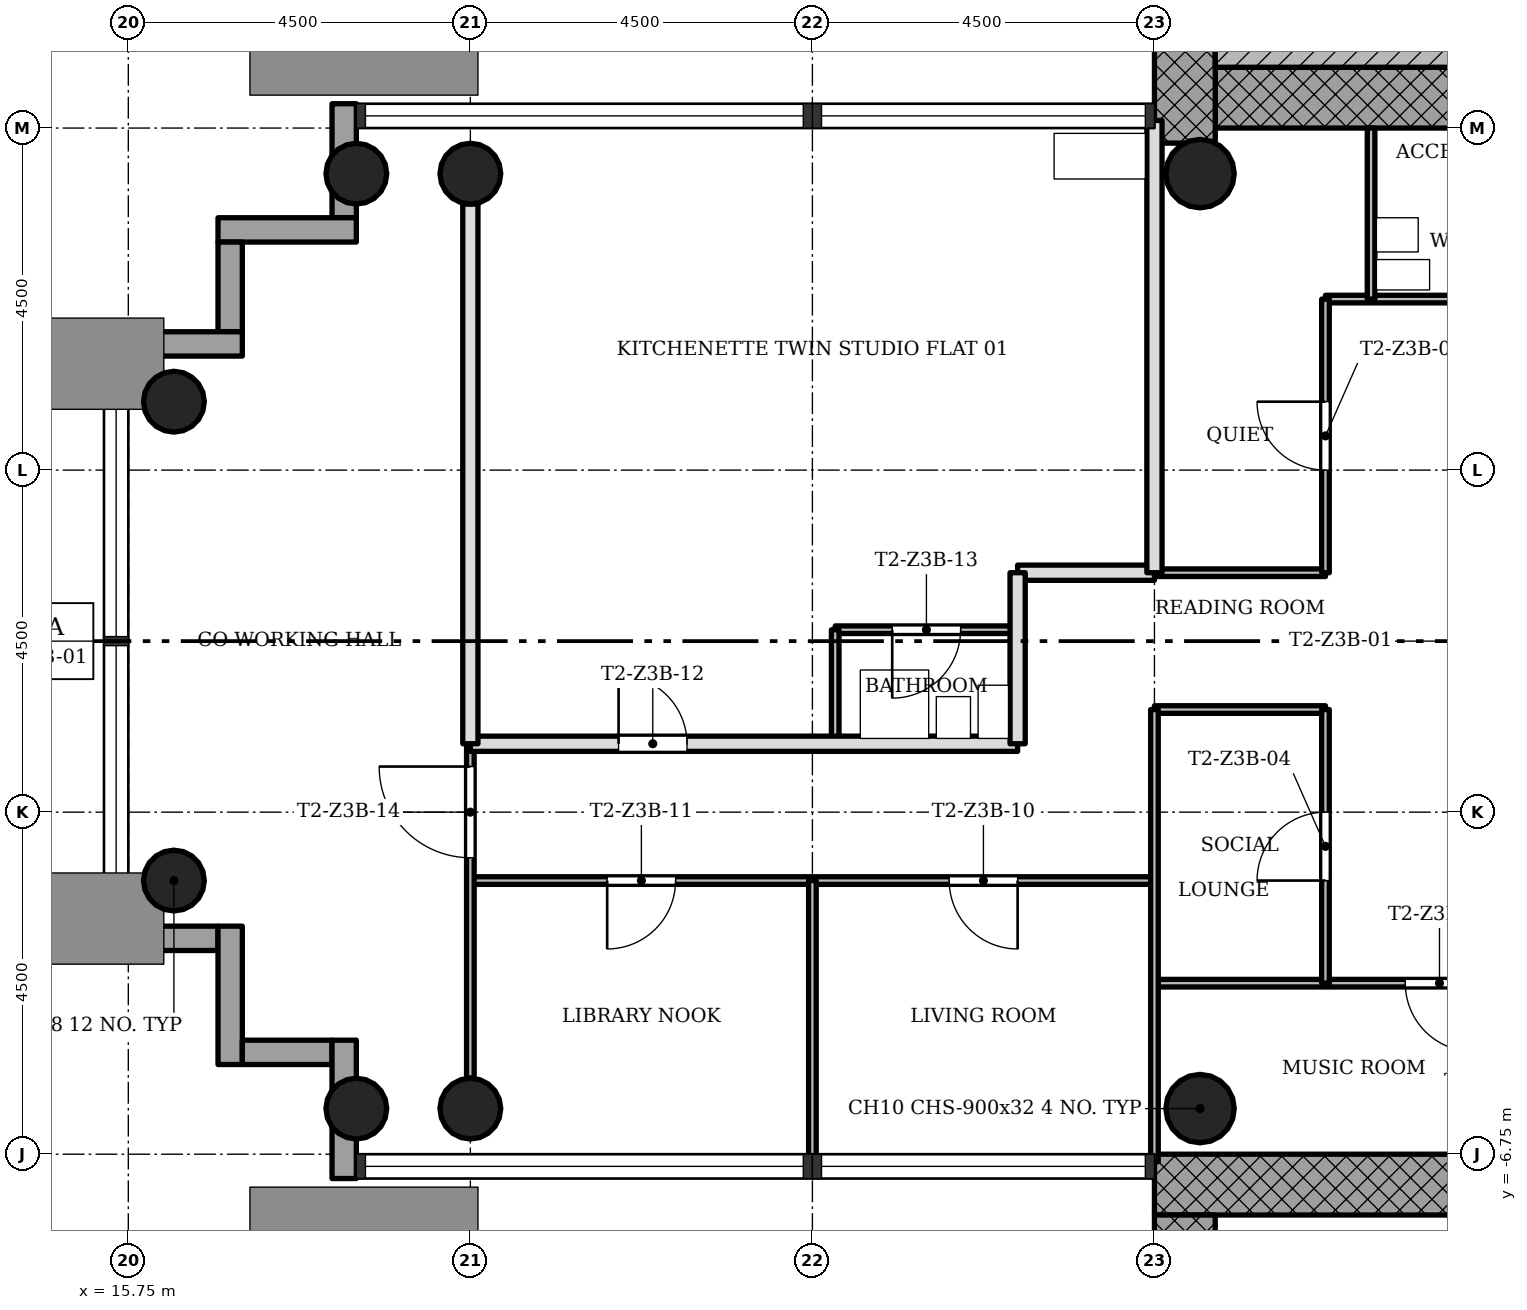
"""IFC4 building model, lengths in metres.
Left out: names, types, materials, properties, quantities, classifications, styles, units other than length and angle.
Written with IfcOpenShell. Run it as: python <this file> out.ifc"""

import sys

from ifc_helpers import new_model, si_unit, direction, frame, frame_2d, origin, origin_2d, place, context, subcontext, project, spatial, rectangle, hollow_circle, extrude, element, fill, save


model = new_model("IFC4")
c1 = context("Model", 3, precision=1e-05, world=origin(), true_north=direction((0.0, 1.0)))
c2 = subcontext(c1, "Body", "Model", "MODEL_VIEW")
j1 = project(units=[si_unit("LENGTHUNIT", "METRE"), si_unit("PLANEANGLEUNIT", "RADIAN")], contexts=[c1])
p1 = place(None, origin())
s1 = spatial("IfcSite", under=j1, at=p1, CompositionType="ELEMENT")
p2 = place(p1, origin())
s2 = spatial("IfcBuilding", under=s1, at=p2, CompositionType="ELEMENT")
p3 = place(p2, frame((0.0, 0.0, 150.7)))
s3 = spatial("IfcBuildingStorey", under=s2, at=p3, CompositionType="ELEMENT", Elevation=150.7)
p4 = place(p3, frame((30.05, 7.15, 0.0), z_axis=(0.0, 0.0, 1.0), x_axis=(1.0, 0.0, 0.0)))
e1 = element("IfcWall", 1, at=p4, inside=s3, PredefinedType="SHEAR", context=c2, shape_type="SweptSolid", body=[
    extrude(rectangle(XDim=12.7, YDim=0.8, at=frame_2d((6.35, 0.0))), origin(), (0.0, 0.0, 1.0), 3.4),
])
p5 = place(p4, frame((5.05, 0.0, 0.0)))
e2 = element("IfcOpeningElement", 2, at=p5, cuts=e1, PredefinedType="OPENING", context=c2, shape_type="SweptSolid", body=[
    extrude(rectangle(XDim=1.8, YDim=2.1, at=frame_2d((0.9, 1.05))), frame((0.0, 0.41, 0.0), z_axis=(0.0, -1.0, 0.0), x_axis=(1.0, 0.0, 0.0)), (0.0, 0.0, 1.0), 0.82),
])
p6 = place(p3, frame((29.65, 15.348, 0.0), z_axis=(0.0, 0.0, 1.0), x_axis=(0.0, -1.0, 0.0)))
e3 = element("IfcWall", 3, at=p6, inside=s3, PredefinedType="SHEAR", context=c2, shape_type="SweptSolid", body=[
    extrude(rectangle(XDim=8.796, YDim=0.8, at=frame_2d((4.398, 0.0))), origin(), (0.0, 0.0, 1.0), 3.4),
])
p7 = place(p3, frame((41.95, -7.15, 0.0), z_axis=(0.0, 0.0, 1.0), x_axis=(-1.0, 0.0, 0.0)))
e4 = element("IfcWall", 4, at=p7, inside=s3, PredefinedType="SHEAR", context=c2, shape_type="SweptSolid", body=[
    extrude(rectangle(XDim=12.7, YDim=0.8, at=frame_2d((6.35, 0.0))), origin(), (0.0, 0.0, 1.0), 3.4),
])
p8 = place(p7, frame((5.05, 0.0, 0.0)))
e5 = element("IfcOpeningElement", 5, at=p8, cuts=e4, PredefinedType="OPENING", context=c2, shape_type="SweptSolid", body=[
    extrude(rectangle(XDim=1.8, YDim=2.1, at=frame_2d((0.9, 1.05))), frame((0.0, 0.41, 0.0), z_axis=(0.0, -1.0, 0.0), x_axis=(1.0, 0.0, 0.0)), (0.0, 0.0, 1.0), 0.82),
])
p9 = place(p3, frame((29.65, -7.55, 0.0), z_axis=(0.0, 0.0, 1.0), x_axis=(0.0, -1.0, 0.0)))
e6 = element("IfcWall", 6, at=p9, inside=s3, PredefinedType="SHEAR", context=c2, shape_type="SweptSolid", body=[
    extrude(rectangle(XDim=8.2, YDim=0.8, at=frame_2d((4.1, 0.0))), origin(), (0.0, 0.0, 1.0), 3.4),
])
for number, where, z_axis, x_axis in (
    (7, (20.25, 6.15, 0.0), (0.0, 0.0, 1.0), (1.0, 0.0, 0.0)),
    (8, (20.25, -6.15, 0.0), (0.0, 0.0, 1.0), (1.0, 0.0, 0.0)),
    (9, (18.75, 6.15, 0.0), (0.0, 0.0, 1.0), (1.0, 0.0, 0.0)),
    (10, (18.75, -6.15, 0.0), (0.0, 0.0, 1.0), (1.0, 0.0, 0.0)),
    (11, (16.35, 3.15, 0.0), (0.0, 0.0, 1.0), (1.0, 0.0, 0.0)),
    (12, (16.35, -3.15, 0.0), (0.0, 0.0, 1.0), (1.0, 0.0, 0.0)),
):
    element("IfcColumn", number, at=place(p3, frame(where, z_axis=z_axis, x_axis=x_axis)), inside=s3, PredefinedType="COLUMN", context=c2, shape_type="SweptSolid", body=[
        extrude(hollow_circle(Radius=0.4, WallThickness=0.028, at=origin_2d()), origin(), (0.0, 0.0, 1.0), 3.4),
    ])
for number, where, z_axis, x_axis in (
    (13, (29.85, 6.15, 0.0), (0.0, 0.0, 1.0), (1.0, 0.0, 0.0)),
    (14, (29.85, -6.15, 0.0), (0.0, 0.0, 1.0), (1.0, 0.0, 0.0)),
):
    element("IfcColumn", number, at=place(p3, frame(where, z_axis=z_axis, x_axis=x_axis)), inside=s3, PredefinedType="COLUMN", context=c2, shape_type="SweptSolid", body=[
        extrude(hollow_circle(Radius=0.45, WallThickness=0.032, at=origin_2d()), origin(), (0.0, 0.0, 1.0), 3.4),
    ])
p10 = place(p3, frame((18.59, 7.07, -0.3), z_axis=(0.0, 0.0, 1.0), x_axis=(0.0, -1.0, 0.0)))
e15 = element("IfcWall", 15, at=p10, inside=s3, PredefinedType="STANDARD", context=c2, shape_type="SweptSolid", body=[
    extrude(rectangle(XDim=1.5, YDim=0.32, at=frame_2d((0.75, 0.0))), origin(), (0.0, 0.0, 1.0), 3.4),
])
p11 = place(p3, frame((18.75, 5.41, -0.3), z_axis=(0.0, 0.0, 1.0), x_axis=(-1.0, 0.0, 0.0)))
e16 = element("IfcWall", 16, at=p11, inside=s3, PredefinedType="STANDARD", context=c2, shape_type="SweptSolid", body=[
    extrude(rectangle(XDim=1.82, YDim=0.32, at=frame_2d((0.91, 0.0))), origin(), (0.0, 0.0, 1.0), 3.4),
])
p12 = place(p3, frame((17.09, 5.25, -0.3), z_axis=(0.0, 0.0, 1.0), x_axis=(0.0, -1.0, 0.0)))
e17 = element("IfcWall", 17, at=p12, inside=s3, PredefinedType="STANDARD", context=c2, shape_type="SweptSolid", body=[
    extrude(rectangle(XDim=1.18, YDim=0.32, at=frame_2d((0.59, 0.0))), origin(), (0.0, 0.0, 1.0), 3.4),
])
p13 = place(p3, frame((17.25, 3.91, -0.3), z_axis=(0.0, 0.0, 1.0), x_axis=(-1.0, 0.0, 0.0)))
e18 = element("IfcWall", 18, at=p13, inside=s3, PredefinedType="STANDARD", context=c2, shape_type="SweptSolid", body=[
    extrude(rectangle(XDim=1.82, YDim=0.32, at=frame_2d((0.91, 0.0))), origin(), (0.0, 0.0, 1.0), 3.4),
])
p14 = place(p3, frame((15.43, -3.91, -0.3), z_axis=(0.0, 0.0, 1.0), x_axis=(1.0, 0.0, 0.0)))
e19 = element("IfcWall", 19, at=p14, inside=s3, PredefinedType="STANDARD", context=c2, shape_type="SweptSolid", body=[
    extrude(rectangle(XDim=1.5, YDim=0.32, at=frame_2d((0.75, 0.0))), origin(), (0.0, 0.0, 1.0), 3.4),
])
p15 = place(p3, frame((17.09, -3.75, -0.3), z_axis=(0.0, 0.0, 1.0), x_axis=(0.0, -1.0, 0.0)))
e20 = element("IfcWall", 20, at=p15, inside=s3, PredefinedType="STANDARD", context=c2, shape_type="SweptSolid", body=[
    extrude(rectangle(XDim=1.82, YDim=0.32, at=frame_2d((0.91, 0.0))), origin(), (0.0, 0.0, 1.0), 3.4),
])
p16 = place(p3, frame((17.25, -5.41, -0.3), z_axis=(0.0, 0.0, 1.0), x_axis=(1.0, 0.0, 0.0)))
e21 = element("IfcWall", 21, at=p16, inside=s3, PredefinedType="STANDARD", context=c2, shape_type="SweptSolid", body=[
    extrude(rectangle(XDim=1.18, YDim=0.32, at=frame_2d((0.59, 0.0))), origin(), (0.0, 0.0, 1.0), 3.4),
])
p17 = place(p3, frame((18.59, -5.25, -0.3), z_axis=(0.0, 0.0, 1.0), x_axis=(0.0, -1.0, 0.0)))
e22 = element("IfcWall", 22, at=p17, inside=s3, PredefinedType="STANDARD", context=c2, shape_type="SweptSolid", body=[
    extrude(rectangle(XDim=1.82, YDim=0.32, at=frame_2d((0.91, 0.0))), origin(), (0.0, 0.0, 1.0), 3.4),
])
p18 = place(p3, frame((34.5, -4.5, 0.0), z_axis=(0.0, 0.0, 1.0), x_axis=(-1.0, 0.0, 0.0)))
e23 = element("IfcWall", 23, at=p18, inside=s3, PredefinedType="PARTITIONING", context=c2, shape_type="SweptSolid", body=[
    extrude(rectangle(XDim=5.25, YDim=0.1, at=frame_2d((2.625, 0.0))), origin(), (0.0, 0.0, 1.0), 3.0),
])
p19 = place(p18, frame((1.05, 0.0, 0.0)))
e24 = element("IfcOpeningElement", 24, at=p19, cuts=e23, PredefinedType="OPENING", context=c2, shape_type="SweptSolid", body=[
    extrude(rectangle(XDim=0.9, YDim=2.1, at=frame_2d((0.45, 1.05))), frame((0.0, 0.06, 0.0), z_axis=(0.0, -1.0, 0.0), x_axis=(1.0, 0.0, 0.0)), (0.0, 0.0, 1.0), 0.12),
])
p20 = place(p3, frame((29.25, -3.15, 0.0), z_axis=(0.0, 0.0, 1.0), x_axis=(-1.0, 0.0, 0.0)))
e25 = element("IfcWall", 25, at=p20, inside=s3, PredefinedType="PARTITIONING", context=c2, shape_type="SweptSolid", body=[
    extrude(rectangle(XDim=9.0, YDim=0.1, at=frame_2d((4.5, 0.0))), origin(), (0.0, 0.0, 1.0), 3.0),
])
p21 = place(p20, frame((1.8, 0.0, 0.0)))
e26 = element("IfcOpeningElement", 26, at=p21, cuts=e25, PredefinedType="OPENING", context=c2, shape_type="SweptSolid", body=[
    extrude(rectangle(XDim=0.9, YDim=2.1, at=frame_2d((0.45, 1.05))), frame((0.0, 0.06, 0.0), z_axis=(0.0, -1.0, 0.0), x_axis=(1.0, 0.0, 0.0)), (0.0, 0.0, 1.0), 0.12),
])
p22 = place(p20, frame((6.3, 0.0, 0.0)))
e27 = element("IfcOpeningElement", 27, at=p22, cuts=e25, PredefinedType="OPENING", context=c2, shape_type="SweptSolid", body=[
    extrude(rectangle(XDim=0.9, YDim=2.1, at=frame_2d((0.45, 1.05))), frame((0.0, 0.06, 0.0), z_axis=(0.0, -1.0, 0.0), x_axis=(1.0, 0.0, 0.0)), (0.0, 0.0, 1.0), 0.12),
])
p23 = place(p3, frame((27.45, -1.35, 0.0), z_axis=(0.0, 0.0, 1.0), x_axis=(-1.0, 0.0, 0.0)))
e28 = element("IfcWall", 28, at=p23, inside=s3, PredefinedType="SOLIDWALL", context=c2, shape_type="SweptSolid", body=[
    extrude(rectangle(XDim=7.2, YDim=0.2, at=frame_2d((3.6, 0.0))), origin(), (0.0, 0.0, 1.0), 3.0),
])
p24 = place(p23, frame((4.35, 0.0, 0.0)))
e29 = element("IfcOpeningElement", 29, at=p24, cuts=e28, PredefinedType="OPENING", context=c2, shape_type="SweptSolid", body=[
    extrude(rectangle(XDim=0.9, YDim=2.1, at=frame_2d((0.45, 1.05))), frame((0.0, 0.11, 0.0), z_axis=(0.0, -1.0, 0.0), x_axis=(1.0, 0.0, 0.0)), (0.0, 0.0, 1.0), 0.22),
])
p25 = place(p3, frame((31.5, -0.9, 0.0), z_axis=(0.0, 0.0, 1.0), x_axis=(-1.0, 0.0, 0.0)))
e30 = element("IfcWall", 30, at=p25, inside=s3, PredefinedType="PARTITIONING", context=c2, shape_type="SweptSolid", body=[
    extrude(rectangle(XDim=2.25, YDim=0.1, at=frame_2d((1.125, 0.0))), origin(), (0.0, 0.0, 1.0), 3.0),
])
p26 = place(p3, frame((27.45, 0.15, 0.0), z_axis=(0.0, 0.0, 1.0), x_axis=(-1.0, 0.0, 0.0)))
e31 = element("IfcWall", 31, at=p26, inside=s3, PredefinedType="PARTITIONING", context=c2, shape_type="SweptSolid", body=[
    extrude(rectangle(XDim=2.4, YDim=0.1, at=frame_2d((1.2, 0.0))), origin(), (0.0, 0.0, 1.0), 3.0),
])
p27 = place(p26, frame((0.75, 0.0, 0.0)))
e32 = element("IfcOpeningElement", 32, at=p27, cuts=e31, PredefinedType="OPENING", context=c2, shape_type="SweptSolid", body=[
    extrude(rectangle(XDim=0.9, YDim=2.1, at=frame_2d((0.45, 1.05))), frame((0.0, 0.06, 0.0), z_axis=(0.0, -1.0, 0.0), x_axis=(1.0, 0.0, 0.0)), (0.0, 0.0, 1.0), 0.12),
])
p28 = place(p3, frame((31.5, 0.9, 0.0), z_axis=(0.0, 0.0, 1.0), x_axis=(-1.0, 0.0, 0.0)))
e33 = element("IfcWall", 33, at=p28, inside=s3, PredefinedType="PARTITIONING", context=c2, shape_type="SweptSolid", body=[
    extrude(rectangle(XDim=2.25, YDim=0.1, at=frame_2d((1.125, 0.0))), origin(), (0.0, 0.0, 1.0), 3.0),
])
p29 = place(p3, frame((29.25, 0.9, 0.0), z_axis=(0.0, 0.0, 1.0), x_axis=(-1.0, 0.0, 0.0)))
e34 = element("IfcWall", 34, at=p29, inside=s3, PredefinedType="SOLIDWALL", context=c2, shape_type="SweptSolid", body=[
    extrude(rectangle(XDim=1.8, YDim=0.2, at=frame_2d((0.9, 0.0))), origin(), (0.0, 0.0, 1.0), 3.0),
])
p30 = place(p3, frame((34.5, 4.5, 0.0), z_axis=(0.0, 0.0, 1.0), x_axis=(-1.0, 0.0, 0.0)))
e35 = element("IfcWall", 35, at=p30, inside=s3, PredefinedType="PARTITIONING", context=c2, shape_type="SweptSolid", body=[
    extrude(rectangle(XDim=3.0, YDim=0.1, at=frame_2d((1.5, 0.0))), origin(), (0.0, 0.0, 1.0), 3.0),
])
p31 = place(p3, frame((32.1, 4.5, 0.0), z_axis=(0.0, 0.0, 1.0), x_axis=(0.0, 1.0, 0.0)))
e36 = element("IfcWall", 36, at=p31, inside=s3, PredefinedType="PARTITIONING", context=c2, shape_type="SweptSolid", body=[
    extrude(rectangle(XDim=2.25, YDim=0.1, at=frame_2d((1.125, 0.0))), origin(), (0.0, 0.0, 1.0), 3.0),
])
p32 = place(p3, frame((31.5, -4.5, 0.0), z_axis=(0.0, 0.0, 1.0), x_axis=(0.0, 1.0, 0.0)))
e37 = element("IfcWall", 37, at=p32, inside=s3, PredefinedType="PARTITIONING", context=c2, shape_type="SweptSolid", body=[
    extrude(rectangle(XDim=3.6, YDim=0.1, at=frame_2d((1.8, 0.0))), origin(), (0.0, 0.0, 1.0), 3.0),
])
p33 = place(p32, frame((1.35, 0.0, 0.0)))
e38 = element("IfcOpeningElement", 38, at=p33, cuts=e37, PredefinedType="OPENING", context=c2, shape_type="SweptSolid", body=[
    extrude(rectangle(XDim=0.9, YDim=2.1, at=frame_2d((0.45, 1.05))), frame((0.0, 0.06, 0.0), z_axis=(0.0, -1.0, 0.0), x_axis=(1.0, 0.0, 0.0)), (0.0, 0.0, 1.0), 0.12),
])
p34 = place(p3, frame((31.5, 0.9, 0.0), z_axis=(0.0, 0.0, 1.0), x_axis=(0.0, 1.0, 0.0)))
e39 = element("IfcWall", 39, at=p34, inside=s3, PredefinedType="PARTITIONING", context=c2, shape_type="SweptSolid", body=[
    extrude(rectangle(XDim=3.6, YDim=0.1, at=frame_2d((1.8, 0.0))), origin(), (0.0, 0.0, 1.0), 3.0),
])
p35 = place(p34, frame((1.35, 0.0, 0.0)))
e40 = element("IfcOpeningElement", 40, at=p35, cuts=e39, PredefinedType="OPENING", context=c2, shape_type="SweptSolid", body=[
    extrude(rectangle(XDim=0.9, YDim=2.1, at=frame_2d((0.45, 1.05))), frame((0.0, 0.06, 0.0), z_axis=(0.0, -1.0, 0.0), x_axis=(1.0, 0.0, 0.0)), (0.0, 0.0, 1.0), 0.12),
])
p36 = place(p3, frame((29.25, -6.85, 0.0), z_axis=(0.0, 0.0, 1.0), x_axis=(0.0, 1.0, 0.0)))
e41 = element("IfcWall", 41, at=p36, inside=s3, PredefinedType="PARTITIONING", context=c2, shape_type="SweptSolid", body=[
    extrude(rectangle(XDim=5.95, YDim=0.1, at=frame_2d((2.975, 0.0))), origin(), (0.0, 0.0, 1.0), 3.0),
])
p37 = place(p3, frame((29.25, 0.9, 0.0), z_axis=(0.0, 0.0, 1.0), x_axis=(0.0, 1.0, 0.0)))
e42 = element("IfcWall", 42, at=p37, inside=s3, PredefinedType="SOLIDWALL", context=c2, shape_type="SweptSolid", body=[
    extrude(rectangle(XDim=5.95, YDim=0.2, at=frame_2d((2.975, 0.0))), origin(), (0.0, 0.0, 1.0), 3.0),
])
p38 = place(p3, frame((27.45, -1.35, 0.0), z_axis=(0.0, 0.0, 1.0), x_axis=(0.0, 1.0, 0.0)))
e43 = element("IfcWall", 43, at=p38, inside=s3, PredefinedType="SOLIDWALL", context=c2, shape_type="SweptSolid", body=[
    extrude(rectangle(XDim=2.25, YDim=0.2, at=frame_2d((1.125, 0.0))), origin(), (0.0, 0.0, 1.0), 3.0),
])
p39 = place(p3, frame((25.05, -1.35, 0.0), z_axis=(0.0, 0.0, 1.0), x_axis=(0.0, 1.0, 0.0)))
e44 = element("IfcWall", 44, at=p39, inside=s3, PredefinedType="PARTITIONING", context=c2, shape_type="SweptSolid", body=[
    extrude(rectangle(XDim=1.5, YDim=0.1, at=frame_2d((0.75, 0.0))), origin(), (0.0, 0.0, 1.0), 3.0),
])
p40 = place(p3, frame((24.75, -6.85, 0.0), z_axis=(0.0, 0.0, 1.0), x_axis=(0.0, 1.0, 0.0)))
e45 = element("IfcWall", 45, at=p40, inside=s3, PredefinedType="PARTITIONING", context=c2, shape_type="SweptSolid", body=[
    extrude(rectangle(XDim=3.7, YDim=0.1, at=frame_2d((1.85, 0.0))), origin(), (0.0, 0.0, 1.0), 3.0),
])
p41 = place(p3, frame((20.25, -5.75, 0.0), z_axis=(0.0, 0.0, 1.0), x_axis=(0.0, 1.0, 0.0)))
e46 = element("IfcWall", 46, at=p41, inside=s3, PredefinedType="PARTITIONING", context=c2, shape_type="SweptSolid", body=[
    extrude(rectangle(XDim=4.4, YDim=0.1, at=frame_2d((2.2, 0.0))), origin(), (0.0, 0.0, 1.0), 3.0),
])
p42 = place(p41, frame((2.9, 0.0, 0.0)))
e47 = element("IfcOpeningElement", 47, at=p42, cuts=e46, PredefinedType="OPENING", context=c2, shape_type="SweptSolid", body=[
    extrude(rectangle(XDim=1.2, YDim=2.1, at=frame_2d((0.6, 1.05))), frame((0.0, 0.06, 0.0), z_axis=(0.0, -1.0, 0.0), x_axis=(1.0, 0.0, 0.0)), (0.0, 0.0, 1.0), 0.12),
])
p43 = place(p3, frame((20.25, -1.35, 0.0), z_axis=(0.0, 0.0, 1.0), x_axis=(0.0, 1.0, 0.0)))
e48 = element("IfcWall", 48, at=p43, inside=s3, PredefinedType="SOLIDWALL", context=c2, shape_type="SweptSolid", body=[
    extrude(rectangle(XDim=7.1, YDim=0.2, at=frame_2d((3.55, 0.0))), origin(), (0.0, 0.0, 1.0), 3.0),
])
p44 = place(p3, frame((34.15, 7.75, 0.0), z_axis=(0.0, 0.0, 1.0), x_axis=(-1.0, 0.0, 0.0)))
e49 = element("IfcWall", 49, at=p44, inside=s3, PredefinedType="SHEAR", context=c2, shape_type="SweptSolid", body=[
    extrude(rectangle(XDim=4.1, YDim=0.4, at=frame_2d((2.05, 0.0))), origin(), (0.0, 0.0, 1.0), 3.4),
])
p45 = place(p35, origin())
e50 = element("IfcDoor", 50, at=p45, inside=s3, OperationType="SINGLE_SWING_LEFT", PredefinedType="DOOR", context=c2, shape_type="SweptSolid", body=[
    extrude(rectangle(XDim=0.9, YDim=2.1, at=frame_2d((0.45, 1.05))), frame((0.0, 0.025, 0.0), z_axis=(0.0, -1.0, 0.0), x_axis=(1.0, 0.0, 0.0)), (0.0, 0.0, 1.0), 0.05),
])
fill(e40, e50)
p46 = place(p33, origin())
e51 = element("IfcDoor", 51, at=p46, inside=s3, OperationType="SINGLE_SWING_RIGHT", PredefinedType="DOOR", context=c2, shape_type="SweptSolid", body=[
    extrude(rectangle(XDim=0.9, YDim=2.1, at=frame_2d((0.45, 1.05))), frame((0.0, 0.025, 0.0), z_axis=(0.0, -1.0, 0.0), x_axis=(1.0, 0.0, 0.0)), (0.0, 0.0, 1.0), 0.05),
])
fill(e38, e51)
p47 = place(p19, origin())
e52 = element("IfcDoor", 52, at=p47, inside=s3, OperationType="SINGLE_SWING_RIGHT", PredefinedType="DOOR", context=c2, shape_type="SweptSolid", body=[
    extrude(rectangle(XDim=0.9, YDim=2.1, at=frame_2d((0.45, 1.05))), frame((0.0, 0.025, 0.0), z_axis=(0.0, -1.0, 0.0), x_axis=(1.0, 0.0, 0.0)), (0.0, 0.0, 1.0), 0.05),
])
fill(e24, e52)
p48 = place(p21, origin())
e53 = element("IfcDoor", 53, at=p48, inside=s3, OperationType="SINGLE_SWING_RIGHT", PredefinedType="DOOR", context=c2, shape_type="SweptSolid", body=[
    extrude(rectangle(XDim=0.9, YDim=2.1, at=frame_2d((0.45, 1.05))), frame((0.0, 0.025, 0.0), z_axis=(0.0, -1.0, 0.0), x_axis=(1.0, 0.0, 0.0)), (0.0, 0.0, 1.0), 0.05),
])
fill(e26, e53)
p49 = place(p22, origin())
e54 = element("IfcDoor", 54, at=p49, inside=s3, OperationType="SINGLE_SWING_LEFT", PredefinedType="DOOR", context=c2, shape_type="SweptSolid", body=[
    extrude(rectangle(XDim=0.9, YDim=2.1, at=frame_2d((0.45, 1.05))), frame((0.0, 0.025, 0.0), z_axis=(0.0, -1.0, 0.0), x_axis=(1.0, 0.0, 0.0)), (0.0, 0.0, 1.0), 0.05),
])
fill(e27, e54)
p50 = place(p24, origin())
e55 = element("IfcDoor", 55, at=p50, inside=s3, OperationType="SINGLE_SWING_RIGHT", PredefinedType="DOOR", context=c2, shape_type="SweptSolid", body=[
    extrude(rectangle(XDim=0.9, YDim=2.1, at=frame_2d((0.45, 1.05))), frame((0.0, 0.025, 0.0), z_axis=(0.0, -1.0, 0.0), x_axis=(1.0, 0.0, 0.0)), (0.0, 0.0, 1.0), 0.05),
])
fill(e29, e55)
p51 = place(p27, origin())
e56 = element("IfcDoor", 56, at=p51, inside=s3, OperationType="SINGLE_SWING_LEFT", PredefinedType="DOOR", context=c2, shape_type="SweptSolid", body=[
    extrude(rectangle(XDim=0.9, YDim=2.1, at=frame_2d((0.45, 1.05))), frame((0.0, 0.025, 0.0), z_axis=(0.0, -1.0, 0.0), x_axis=(1.0, 0.0, 0.0)), (0.0, 0.0, 1.0), 0.05),
])
fill(e32, e56)
p52 = place(p42, origin())
e57 = element("IfcDoor", 57, at=p52, inside=s3, OperationType="SINGLE_SWING_LEFT", PredefinedType="DOOR", context=c2, shape_type="SweptSolid", body=[
    extrude(rectangle(XDim=1.2, YDim=2.1, at=frame_2d((0.6, 1.05))), frame((0.0, 0.025, 0.0), z_axis=(0.0, -1.0, 0.0), x_axis=(1.0, 0.0, 0.0)), (0.0, 0.0, 1.0), 0.05),
])
fill(e47, e57)
save(model, sys.argv[1])
